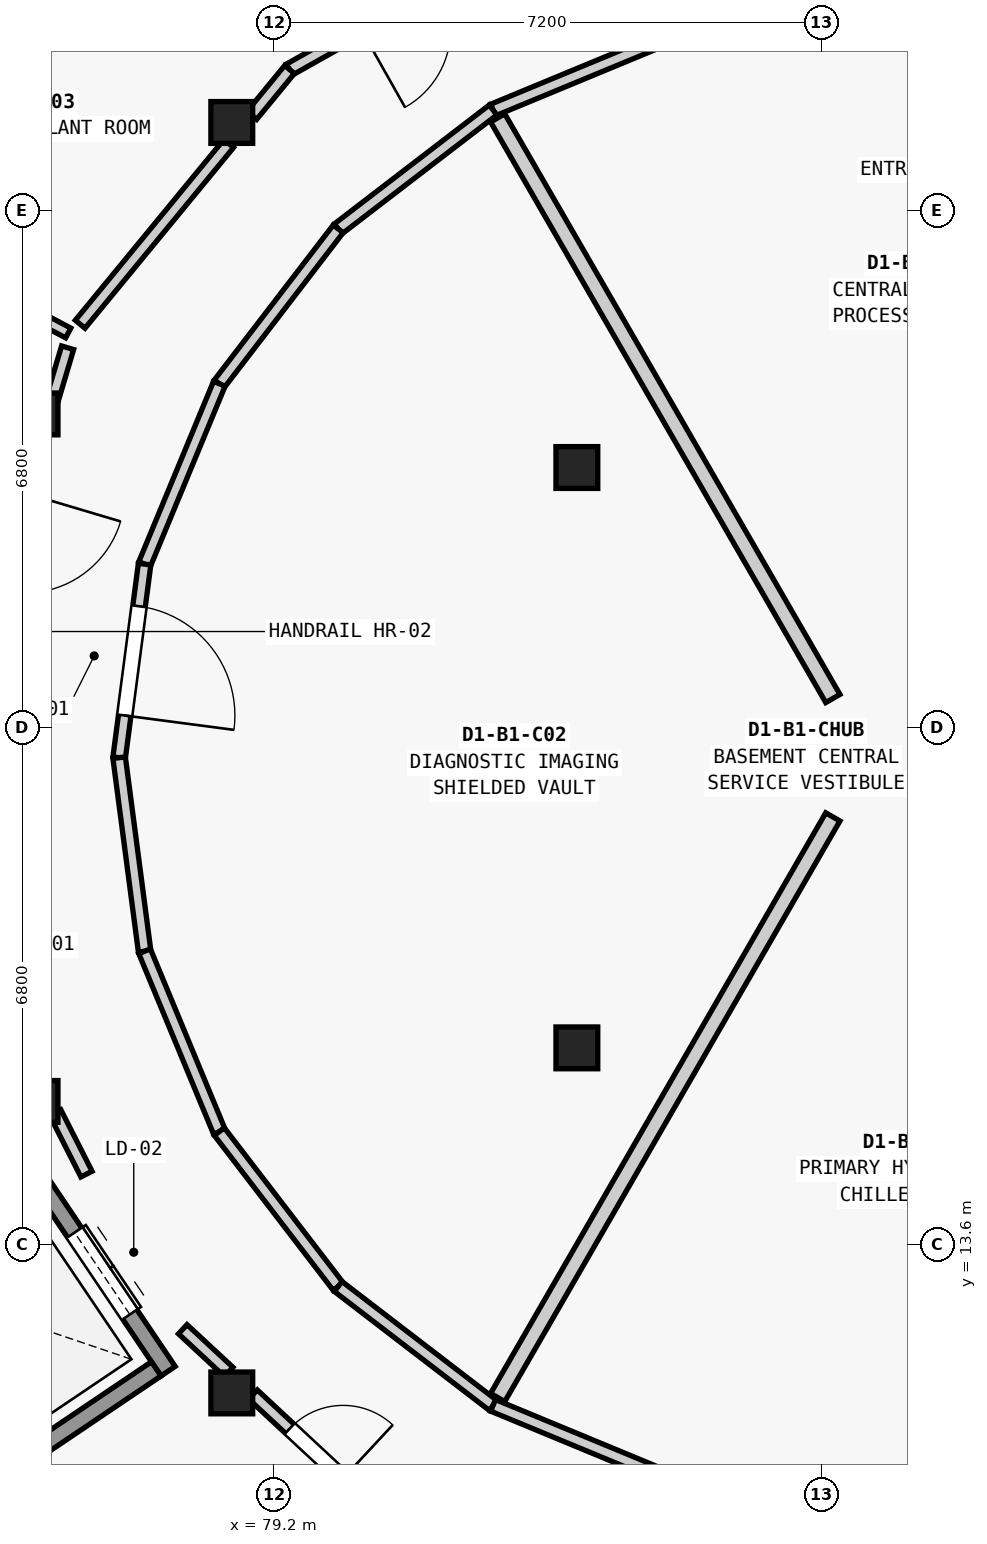
"""IFC4 building model, lengths in metres.
Left out: names, types, materials, properties, quantities, classifications, styles, units other than length and angle.
Written with IfcOpenShell. Run it as: python <this file> out.ifc"""

import sys

from ifc_helpers import new_model, si_unit, direction, frame, frame_2d, origin, origin_2d, place, context, subcontext, project, spatial, rectangle, extrude, element, fill, save


model = new_model("IFC4")
c1 = context("Model", 3, precision=1e-05, world=origin(), true_north=direction((0.0, 1.0)))
c2 = subcontext(c1, "Body", "Model", "MODEL_VIEW")
j1 = project(units=[si_unit("LENGTHUNIT", "METRE"), si_unit("PLANEANGLEUNIT", "RADIAN")], contexts=[c1])
p1 = place(None, origin())
s1 = spatial("IfcSite", under=j1, at=p1, CompositionType="ELEMENT")
p2 = place(p1, origin())
s2 = spatial("IfcBuilding", under=s1, at=p2, CompositionType="ELEMENT")
p3 = place(p2, frame((0.0, 0.0, -4.55)))
s3 = spatial("IfcBuildingStorey", under=s2, at=p3, CompositionType="ELEMENT", Elevation=-4.55)
for number, where, z_axis, x_axis in (
    (1, (78.642, 28.358, 0.0), (0.0, 0.0, 1.0), (1.0, 0.0, 0.0)),
    (2, (76.08, 24.523, 0.0), (0.0, 0.0, 1.0), (1.0, 0.0, 0.0)),
    (3, (76.08, 15.477, 0.0), (0.0, 0.0, 1.0), (1.0, 0.0, 0.0)),
    (4, (78.642, 11.642, 0.0), (0.0, 0.0, 1.0), (1.0, 0.0, 0.0)),
    (5, (83.182, 23.818, 0.0), (0.0, 0.0, 1.0), (1.0, 0.0, 0.0)),
    (6, (83.182, 16.182, 0.0), (0.0, 0.0, 1.0), (1.0, 0.0, 0.0)),
):
    element("IfcColumn", number, at=place(p3, frame(where, z_axis=z_axis, x_axis=x_axis)), inside=s3, PredefinedType="COLUMN", context=c2, shape_type="SweptSolid", body=[
        extrude(rectangle(XDim=0.55, YDim=0.55, at=origin_2d()), origin(), (0.0, 0.0, 1.0), 4.55),
    ])
p4 = place(p3, frame((77.804, 11.928, 0.0), z_axis=(0.0, 0.0, 1.0), x_axis=(-0.559054792443, 0.829130712883, 0.0)))
e7 = element("IfcWall", 7, at=p4, inside=s3, PredefinedType="SHEAR", context=c2, shape_type="SweptSolid", body=[
    extrude(rectangle(XDim=3.1, YDim=0.225, at=frame_2d((1.55, 0.0))), origin(), (0.0, 0.0, 1.0), 4.135),
])
p5 = place(p4, frame((0.9, 0.0, 0.0)))
e8 = element("IfcOpeningElement", 8, at=p5, cuts=e7, PredefinedType="OPENING", context=c2, shape_type="SweptSolid", body=[
    extrude(rectangle(XDim=1.3, YDim=2.2, at=frame_2d((0.65, 1.1))), frame((0.0, 0.123, 0.0), z_axis=(0.0, -1.0, 0.0), x_axis=(1.0, 0.0, 0.0)), (0.0, 0.0, 1.0), 0.245),
])
p6 = place(p3, frame((77.648, 11.958, 0.0), z_axis=(0.0, 0.0, 1.0), x_axis=(-0.829050086962, -0.559174349652, 0.0)))
e9 = element("IfcWall", 9, at=p6, inside=s3, PredefinedType="SHEAR", context=c2, shape_type="SweptSolid", body=[
    extrude(rectangle(XDim=2.149, YDim=0.225, at=frame_2d((1.075, 0.0))), origin(), (0.0, 0.0, 1.0), 4.135),
])
for number, where, z_axis, x_axis in (
    (10, (86.55, 20.779, 0.0), (0.0, 0.0, 1.0), (-0.5, 0.866, 0.0)),
    (11, (86.55, 19.221, 0.0), (0.0, 0.0, 1.0), (-0.5, -0.866, 0.0)),
):
    element("IfcWall", number, at=place(p3, frame(where, z_axis=z_axis, x_axis=x_axis)), inside=s3, PredefinedType="SOLIDWALL", context=c2, shape_type="SweptSolid", body=[
        extrude(rectangle(XDim=8.821, YDim=0.215, at=frame_2d((4.41, 0.0))), origin(), (0.0, 0.0, 1.0), 2.76),
    ])
p7 = place(p3, frame((84.453, 29.505, 0.0), z_axis=(0.0, 0.0, 1.0), x_axis=(-0.923870848353, -0.382704397106, 0.0)))
e12 = element("IfcWall", 12, at=p7, inside=s3, PredefinedType="PARTITIONING", context=c2, shape_type="SweptSolid", body=[
    extrude(rectangle(XDim=2.568, YDim=0.165, at=frame_2d((1.284, 0.0))), origin(), (0.0, 0.0, 1.0), 2.76),
])
for number, where, z_axis, x_axis in (
    (13, (82.08, 28.522, 0.0), (0.0, 0.0, 1.0), (-0.793, -0.609, 0.0)),
    (14, (80.042, 26.958, 0.0), (0.0, 0.0, 1.0), (-0.609, -0.793, 0.0)),
):
    element("IfcWall", number, at=place(p3, frame(where, z_axis=z_axis, x_axis=x_axis)), inside=s3, PredefinedType="PARTITIONING", context=c2, shape_type="SweptSolid", body=[
        extrude(rectangle(XDim=2.569, YDim=0.165, at=frame_2d((1.285, 0.0))), origin(), (0.0, 0.0, 1.0), 2.76),
    ])
p8 = place(p3, frame((78.478, 24.92, 0.0), z_axis=(0.0, 0.0, 1.0), x_axis=(-0.382704397106, -0.923870848353, 0.0)))
e15 = element("IfcWall", 15, at=p8, inside=s3, PredefinedType="PARTITIONING", context=c2, shape_type="SweptSolid", body=[
    extrude(rectangle(XDim=2.568, YDim=0.165, at=frame_2d((1.284, 0.0))), origin(), (0.0, 0.0, 1.0), 2.76),
])
p9 = place(p3, frame((77.495, 22.547, 0.0), z_axis=(0.0, 0.0, 1.0), x_axis=(-0.130476636685, -0.991451384224, 0.0)))
e16 = element("IfcWall", 16, at=p9, inside=s3, PredefinedType="PARTITIONING", context=c2, shape_type="SweptSolid", body=[
    extrude(rectangle(XDim=2.569, YDim=0.165, at=frame_2d((1.285, 0.0))), origin(), (0.0, 0.0, 1.0), 2.76),
])
p10 = place(p9, frame((0.559, 0.0, 0.0)))
e17 = element("IfcOpeningElement", 17, at=p10, cuts=e16, PredefinedType="OPENING", context=c2, shape_type="SweptSolid", body=[
    extrude(rectangle(XDim=1.45, YDim=2.28, at=frame_2d((0.725, 1.14))), frame((0.0, 0.093, 0.0), z_axis=(0.0, -1.0, 0.0), x_axis=(1.0, 0.0, 0.0)), (0.0, 0.0, 1.0), 0.185),
])
p11 = place(p3, frame((77.16, 20.0, 0.0), z_axis=(0.0, 0.0, 1.0), x_axis=(0.130476636685, -0.991451384224, 0.0)))
e18 = element("IfcWall", 18, at=p11, inside=s3, PredefinedType="PARTITIONING", context=c2, shape_type="SweptSolid", body=[
    extrude(rectangle(XDim=2.569, YDim=0.165, at=frame_2d((1.285, 0.0))), origin(), (0.0, 0.0, 1.0), 2.76),
])
p12 = place(p3, frame((77.495, 17.453, 0.0), z_axis=(0.0, 0.0, 1.0), x_axis=(0.382704397106, -0.923870848353, 0.0)))
e19 = element("IfcWall", 19, at=p12, inside=s3, PredefinedType="PARTITIONING", context=c2, shape_type="SweptSolid", body=[
    extrude(rectangle(XDim=2.568, YDim=0.165, at=frame_2d((1.284, 0.0))), origin(), (0.0, 0.0, 1.0), 2.76),
])
for number, where, z_axis, x_axis in (
    (20, (78.478, 15.08, 0.0), (0.0, 0.0, 1.0), (0.609, -0.793, 0.0)),
    (21, (80.042, 13.042, 0.0), (0.0, 0.0, 1.0), (0.793, -0.609, 0.0)),
):
    element("IfcWall", number, at=place(p3, frame(where, z_axis=z_axis, x_axis=x_axis)), inside=s3, PredefinedType="PARTITIONING", context=c2, shape_type="SweptSolid", body=[
        extrude(rectangle(XDim=2.569, YDim=0.165, at=frame_2d((1.285, 0.0))), origin(), (0.0, 0.0, 1.0), 2.76),
    ])
p13 = place(p3, frame((82.08, 11.478, 0.0), z_axis=(0.0, 0.0, 1.0), x_axis=(0.923870848353, -0.382704397106, 0.0)))
e22 = element("IfcWall", 22, at=p13, inside=s3, PredefinedType="PARTITIONING", context=c2, shape_type="SweptSolid", body=[
    extrude(rectangle(XDim=2.568, YDim=0.165, at=frame_2d((1.284, 0.0))), origin(), (0.0, 0.0, 1.0), 2.76),
])
p14 = place(p3, frame((76.49, 25.588, 0.0), z_axis=(0.0, 0.0, 1.0), x_axis=(-0.882920316433, 0.469522858688, 0.0)))
e23 = element("IfcWall", 23, at=p14, inside=s3, PredefinedType="PARTITIONING", context=c2, shape_type="SweptSolid", body=[
    extrude(rectangle(XDim=3.819, YDim=0.145, at=frame_2d((1.91, 0.0))), origin(), (0.0, 0.0, 1.0), 2.76),
])
p15 = place(p3, frame((82.311, 30.695, 0.0), z_axis=(0.0, 0.0, 1.0), x_axis=(-0.871081128007, -0.491139153836, 0.0)))
e24 = element("IfcWall", 24, at=p15, inside=s3, PredefinedType="PARTITIONING", context=c2, shape_type="SweptSolid", body=[
    extrude(rectangle(XDim=3.339, YDim=0.165, at=frame_2d((1.67, 0.0))), origin(), (0.0, 0.0, 1.0), 2.76),
])
p16 = place(p15, frame((1.08, 0.0, 0.0)))
e25 = element("IfcOpeningElement", 25, at=p16, cuts=e24, PredefinedType="OPENING", context=c2, shape_type="SweptSolid", body=[
    extrude(rectangle(XDim=1.18, YDim=2.2, at=frame_2d((0.59, 1.1))), frame((0.0, 0.093, 0.0), z_axis=(0.0, -1.0, 0.0), x_axis=(1.0, 0.0, 0.0)), (0.0, 0.0, 1.0), 0.185),
])
p17 = place(p3, frame((79.402, 29.055, 0.0), z_axis=(0.0, 0.0, 1.0), x_axis=(-0.634699456668, -0.772759082577, 0.0)))
e26 = element("IfcWall", 26, at=p17, inside=s3, PredefinedType="PARTITIONING", context=c2, shape_type="SweptSolid", body=[
    extrude(rectangle(XDim=0.782, YDim=0.165, at=frame_2d((0.391, 0.0))), origin(), (0.0, 0.0, 1.0), 2.76),
])
p18 = place(p3, frame((78.602, 28.081, 0.0), z_axis=(0.0, 0.0, 1.0), x_axis=(-0.635045466024, -0.772474760806, 0.0)))
e27 = element("IfcWall", 27, at=p18, inside=s3, PredefinedType="PARTITIONING", context=c2, shape_type="SweptSolid", body=[
    extrude(rectangle(XDim=3.079, YDim=0.165, at=frame_2d((1.539, 0.0))), origin(), (0.0, 0.0, 1.0), 2.76),
])
p19 = place(p3, frame((76.482, 25.394, 0.0), z_axis=(0.0, 0.0, 1.0), x_axis=(-0.284901497141, -0.958556799009, 0.0)))
e28 = element("IfcWall", 28, at=p19, inside=s3, PredefinedType="PARTITIONING", context=c2, shape_type="SweptSolid", body=[
    extrude(rectangle(XDim=0.705, YDim=0.165, at=frame_2d((0.353, 0.0))), origin(), (0.0, 0.0, 1.0), 2.76),
])
p20 = place(p3, frame((76.319, 15.331, 0.0), z_axis=(0.0, 0.0, 1.0), x_axis=(0.452366842615, -0.891831957099, 0.0)))
e29 = element("IfcWall", 29, at=p20, inside=s3, PredefinedType="PARTITIONING", context=c2, shape_type="SweptSolid", body=[
    extrude(rectangle(XDim=0.908, YDim=0.165, at=frame_2d((0.454, 0.0))), origin(), (0.0, 0.0, 1.0), 2.76),
])
p21 = place(p3, frame((77.997, 12.48, 0.0), z_axis=(0.0, 0.0, 1.0), x_axis=(0.732688002882, -0.680564684973, 0.0)))
e30 = element("IfcWall", 30, at=p21, inside=s3, PredefinedType="PARTITIONING", context=c2, shape_type="SweptSolid", body=[
    extrude(rectangle(XDim=0.824, YDim=0.165, at=frame_2d((0.412, 0.0))), origin(), (0.0, 0.0, 1.0), 2.76),
])
p22 = place(p3, frame((78.921, 11.621, 0.0), z_axis=(0.0, 0.0, 1.0), x_axis=(0.73211336643, -0.681182808572, 0.0)))
e31 = element("IfcWall", 31, at=p22, inside=s3, PredefinedType="PARTITIONING", context=c2, shape_type="SweptSolid", body=[
    extrude(rectangle(XDim=2.277, YDim=0.165, at=frame_2d((1.138, 0.0))), origin(), (0.0, 0.0, 1.0), 2.76),
])
p23 = place(p22, frame((0.659, 0.0, 0.0)))
e32 = element("IfcOpeningElement", 32, at=p23, cuts=e31, PredefinedType="OPENING", context=c2, shape_type="SweptSolid", body=[
    extrude(rectangle(XDim=0.96, YDim=2.12, at=frame_2d((0.48, 1.06))), frame((0.0, 0.093, 0.0), z_axis=(0.0, -1.0, 0.0), x_axis=(1.0, 0.0, 0.0)), (0.0, 0.0, 1.0), 0.185),
])
p24 = place(p5, origin())
e33 = element("IfcDoor", 33, at=p24, inside=s3, OperationType="DOUBLE_DOOR_SLIDING", PredefinedType="DOOR", context=c2, shape_type="SweptSolid", body=[
    extrude(rectangle(XDim=1.3, YDim=2.2, at=frame_2d((0.65, 1.1))), frame((0.0, 0.025, 0.0), z_axis=(0.0, -1.0, 0.0), x_axis=(1.0, 0.0, 0.0)), (0.0, 0.0, 1.0), 0.05),
])
fill(e8, e33)
p25 = place(p10, origin())
e34 = element("IfcDoor", 34, at=p25, inside=s3, OperationType="SINGLE_SWING_RIGHT", PredefinedType="DOOR", context=c2, shape_type="SweptSolid", body=[
    extrude(rectangle(XDim=1.45, YDim=2.28, at=frame_2d((0.725, 1.14))), frame((0.0, 0.025, 0.0), z_axis=(0.0, -1.0, 0.0), x_axis=(1.0, 0.0, 0.0)), (0.0, 0.0, 1.0), 0.05),
])
fill(e17, e34)
p26 = place(p23, origin())
e35 = element("IfcDoor", 35, at=p26, inside=s3, OperationType="SINGLE_SWING_RIGHT", PredefinedType="DOOR", context=c2, shape_type="SweptSolid", body=[
    extrude(rectangle(XDim=0.96, YDim=2.12, at=frame_2d((0.48, 1.06))), frame((0.0, 0.025, 0.0), z_axis=(0.0, -1.0, 0.0), x_axis=(1.0, 0.0, 0.0)), (0.0, 0.0, 1.0), 0.05),
])
fill(e32, e35)
save(model, sys.argv[1])
